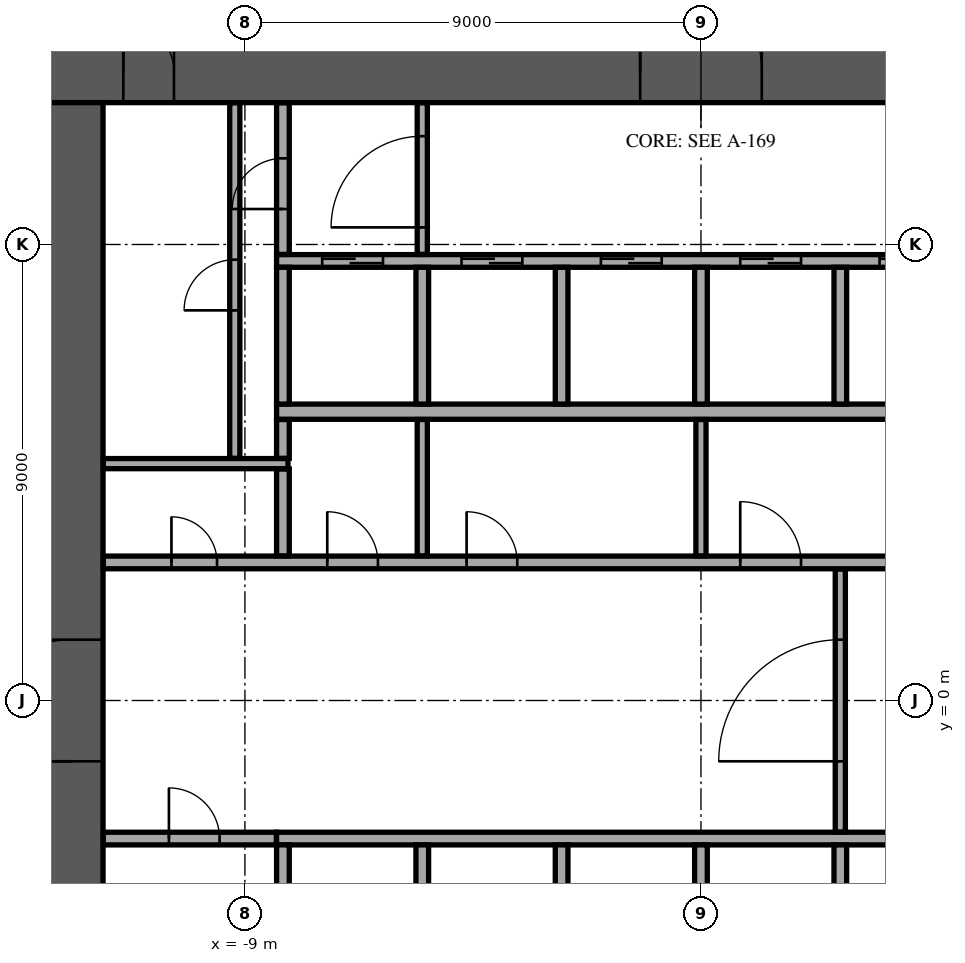
"""IFC4 building model, lengths in metres.
Left out: names, types, materials, properties, quantities, classifications, styles, units other than length and angle.
Written with IfcOpenShell. Run it as: python <this file> out.ifc"""

import sys

from ifc_helpers import new_model, si_unit, direction, frame, frame_2d, origin, place, context, subcontext, project, spatial, rectangle, extrude, element, fill, save


model = new_model("IFC4")
c1 = context("Model", 3, precision=1e-05, world=origin(), true_north=direction((0.0, 1.0)))
c2 = subcontext(c1, "Body", "Model", "MODEL_VIEW")
j1 = project(units=[si_unit("LENGTHUNIT", "METRE"), si_unit("PLANEANGLEUNIT", "RADIAN")], contexts=[c1])
p1 = place(None, origin())
s1 = spatial("IfcSite", under=j1, at=p1, CompositionType="ELEMENT")
p2 = place(p1, origin())
s2 = spatial("IfcBuilding", under=s1, at=p2, CompositionType="ELEMENT")
p3 = place(p2, frame((0.0, 0.0, 27.3)))
s3 = spatial("IfcBuildingStorey", under=s2, at=p3, CompositionType="ELEMENT", Elevation=27.3)
p4 = place(p3, frame((-13.0, 12.4, 0.0), z_axis=(0.0, 0.0, 1.0), x_axis=(1.0, 0.0, 0.0)))
e1 = element("IfcWall", 1, at=p4, inside=s3, PredefinedType="SHEAR", context=c2, shape_type="SweptSolid", body=[
    extrude(rectangle(XDim=26.0, YDim=1.2, at=frame_2d((13.0, 0.0))), origin(), (0.0, 0.0, 1.0), 4.35),
])
p5 = place(p4, frame((11.8, 0.0, 0.0)))
e2 = element("IfcOpeningElement", 2, at=p5, cuts=e1, PredefinedType="OPENING", context=c2, shape_type="SweptSolid", body=[
    extrude(rectangle(XDim=2.4, YDim=2.4, at=frame_2d((1.2, 1.2))), frame((0.0, 0.61, 0.0), z_axis=(0.0, -1.0, 0.0), x_axis=(1.0, 0.0, 0.0)), (0.0, 0.0, 1.0), 1.22),
])
p6 = place(p4, frame((22.625, 0.0, 0.0)))
e3 = element("IfcOpeningElement", 3, at=p6, cuts=e1, PredefinedType="OPENING", context=c2, shape_type="SweptSolid", body=[
    extrude(rectangle(XDim=1.2, YDim=2.1, at=frame_2d((0.6, 1.05))), frame((0.0, 0.61, 0.0), z_axis=(0.0, -1.0, 0.0), x_axis=(1.0, 0.0, 0.0)), (0.0, 0.0, 1.0), 1.22),
])
p7 = place(p4, frame((1.6, 0.0, 0.0)))
e4 = element("IfcOpeningElement", 4, at=p7, cuts=e1, PredefinedType="OPENING", context=c2, shape_type="SweptSolid", body=[
    extrude(rectangle(XDim=1.0, YDim=2.1, at=frame_2d((0.5, 1.05))), frame((0.0, 0.61, 0.0), z_axis=(0.0, -1.0, 0.0), x_axis=(1.0, 0.0, 0.0)), (0.0, 0.0, 1.0), 1.22),
])
p8 = place(p3, frame((-12.4, -11.8, 0.0), z_axis=(0.0, 0.0, 1.0), x_axis=(0.0, 1.0, 0.0)))
e5 = element("IfcWall", 5, at=p8, inside=s3, PredefinedType="SHEAR", context=c2, shape_type="SweptSolid", body=[
    extrude(rectangle(XDim=23.6, YDim=1.2, at=frame_2d((11.8, 0.0))), origin(), (0.0, 0.0, 1.0), 4.35),
])
p9 = place(p8, frame((10.6, 0.0, 0.0)))
e6 = element("IfcOpeningElement", 6, at=p9, cuts=e5, PredefinedType="OPENING", context=c2, shape_type="SweptSolid", body=[
    extrude(rectangle(XDim=2.4, YDim=2.4, at=frame_2d((1.2, 1.2))), frame((0.0, 0.61, 0.0), z_axis=(0.0, -1.0, 0.0), x_axis=(1.0, 0.0, 0.0)), (0.0, 0.0, 1.0), 1.22),
])
p10 = place(p3, frame((-8.375, 5.7, 0.0), z_axis=(0.0, 0.0, 1.0), x_axis=(1.0, 0.0, 0.0)))
e7 = element("IfcWall", 7, at=p10, inside=s3, PredefinedType="SOLIDWALL", context=c2, shape_type="SweptSolid", body=[
    extrude(rectangle(XDim=16.75, YDim=0.3, at=frame_2d((8.375, 0.0))), origin(), (0.0, 0.0, 1.0), 4.35),
])
p11 = place(p3, frame((-8.375, 8.675, 0.0), z_axis=(0.0, 0.0, 1.0), x_axis=(1.0, 0.0, 0.0)))
e8 = element("IfcWall", 8, at=p11, inside=s3, PredefinedType="SOLIDWALL", context=c2, shape_type="SweptSolid", body=[
    extrude(rectangle(XDim=16.75, YDim=0.25, at=frame_2d((8.375, 0.0))), origin(), (0.0, 0.0, 1.0), 4.35),
])
p12 = place(p11, frame((0.9, 0.0, 0.0)))
e9 = element("IfcOpeningElement", 9, at=p12, cuts=e8, PredefinedType="OPENING", context=c2, shape_type="SweptSolid", body=[
    extrude(rectangle(XDim=1.2, YDim=2.1, at=frame_2d((0.6, 1.05))), frame((0.0, 0.135, 0.0), z_axis=(0.0, -1.0, 0.0), x_axis=(1.0, 0.0, 0.0)), (0.0, 0.0, 1.0), 0.27),
])
p13 = place(p11, frame((3.65, 0.0, 0.0)))
e10 = element("IfcOpeningElement", 10, at=p13, cuts=e8, PredefinedType="OPENING", context=c2, shape_type="SweptSolid", body=[
    extrude(rectangle(XDim=1.2, YDim=2.1, at=frame_2d((0.6, 1.05))), frame((0.0, 0.135, 0.0), z_axis=(0.0, -1.0, 0.0), x_axis=(1.0, 0.0, 0.0)), (0.0, 0.0, 1.0), 0.27),
])
p14 = place(p11, frame((6.4, 0.0, 0.0)))
e11 = element("IfcOpeningElement", 11, at=p14, cuts=e8, PredefinedType="OPENING", context=c2, shape_type="SweptSolid", body=[
    extrude(rectangle(XDim=1.2, YDim=2.1, at=frame_2d((0.6, 1.05))), frame((0.0, 0.135, 0.0), z_axis=(0.0, -1.0, 0.0), x_axis=(1.0, 0.0, 0.0)), (0.0, 0.0, 1.0), 0.27),
])
p15 = place(p11, frame((9.15, 0.0, 0.0)))
e12 = element("IfcOpeningElement", 12, at=p15, cuts=e8, PredefinedType="OPENING", context=c2, shape_type="SweptSolid", body=[
    extrude(rectangle(XDim=1.2, YDim=2.1, at=frame_2d((0.6, 1.05))), frame((0.0, 0.135, 0.0), z_axis=(0.0, -1.0, 0.0), x_axis=(1.0, 0.0, 0.0)), (0.0, 0.0, 1.0), 0.27),
])
p16 = place(p11, frame((11.9, 0.0, 0.0)))
e13 = element("IfcOpeningElement", 13, at=p16, cuts=e8, PredefinedType="OPENING", context=c2, shape_type="SweptSolid", body=[
    extrude(rectangle(XDim=1.2, YDim=2.1, at=frame_2d((0.6, 1.05))), frame((0.0, 0.135, 0.0), z_axis=(0.0, -1.0, 0.0), x_axis=(1.0, 0.0, 0.0)), (0.0, 0.0, 1.0), 0.27),
])
p17 = place(p11, frame((14.65, 0.0, 0.0)))
e14 = element("IfcOpeningElement", 14, at=p17, cuts=e8, PredefinedType="OPENING", context=c2, shape_type="SweptSolid", body=[
    extrude(rectangle(XDim=1.2, YDim=2.1, at=frame_2d((0.6, 1.05))), frame((0.0, 0.135, 0.0), z_axis=(0.0, -1.0, 0.0), x_axis=(1.0, 0.0, 0.0)), (0.0, 0.0, 1.0), 0.27),
])
for number, where, z_axis, x_axis in (
    (15, (-8.25, 5.85, 0.0), (0.0, 0.0, 1.0), (0.0, 1.0, 0.0)),
    (16, (-5.5, 5.85, 0.0), (0.0, 0.0, 1.0), (0.0, 1.0, 0.0)),
    (17, (-2.75, 5.85, 0.0), (0.0, 0.0, 1.0), (0.0, 1.0, 0.0)),
    (18, (0.0, 5.85, 0.0), (0.0, 0.0, 1.0), (0.0, 1.0, 0.0)),
    (19, (2.75, 5.85, 0.0), (0.0, 0.0, 1.0), (0.0, 1.0, 0.0)),
):
    element("IfcWall", number, at=place(p3, frame(where, z_axis=z_axis, x_axis=x_axis)), inside=s3, PredefinedType="SOLIDWALL", context=c2, shape_type="SweptSolid", body=[
        extrude(rectangle(XDim=2.7, YDim=0.25, at=frame_2d((1.35, 0.0))), origin(), (0.0, 0.0, 1.0), 4.35),
    ])
p18 = place(p3, frame((-8.375, -2.725, 0.0), z_axis=(0.0, 0.0, 1.0), x_axis=(1.0, 0.0, 0.0)))
e20 = element("IfcWall", 20, at=p18, inside=s3, PredefinedType="SOLIDWALL", context=c2, shape_type="SweptSolid", body=[
    extrude(rectangle(XDim=14.0, YDim=0.25, at=frame_2d((7.0, 0.0))), origin(), (0.0, 0.0, 1.0), 4.35),
])
for number, where, z_axis, x_axis in (
    (21, (-8.25, -5.55, 0.0), (0.0, 0.0, 1.0), (0.0, 1.0, 0.0)),
    (22, (-5.5, -5.55, 0.0), (0.0, 0.0, 1.0), (0.0, 1.0, 0.0)),
    (23, (-2.75, -5.55, 0.0), (0.0, 0.0, 1.0), (0.0, 1.0, 0.0)),
    (24, (0.0, -5.55, 0.0), (0.0, 0.0, 1.0), (0.0, 1.0, 0.0)),
    (25, (2.75, -5.55, 0.0), (0.0, 0.0, 1.0), (0.0, 1.0, 0.0)),
):
    element("IfcWall", number, at=place(p3, frame(where, z_axis=z_axis, x_axis=x_axis)), inside=s3, PredefinedType="SOLIDWALL", context=c2, shape_type="SweptSolid", body=[
        extrude(rectangle(XDim=2.7, YDim=0.25, at=frame_2d((1.35, 0.0))), origin(), (0.0, 0.0, 1.0), 4.35),
    ])
p19 = place(p3, frame((-11.795, -2.725, 0.0), z_axis=(0.0, 0.0, 1.0), x_axis=(1.0, 0.0, 0.0)))
e26 = element("IfcWall", 26, at=p19, inside=s3, PredefinedType="PARTITIONING", context=c2, shape_type="SweptSolid", body=[
    extrude(rectangle(XDim=3.415, YDim=0.25, at=frame_2d((1.708, 0.0))), origin(), (0.0, 0.0, 1.0), 4.35),
])
p20 = place(p19, frame((1.295, 0.0, 0.0)))
e27 = element("IfcOpeningElement", 27, at=p20, cuts=e26, PredefinedType="OPENING", context=c2, shape_type="SweptSolid", body=[
    extrude(rectangle(XDim=1.0, YDim=2.1, at=frame_2d((0.5, 1.05))), frame((0.0, 0.135, 0.0), z_axis=(0.0, -1.0, 0.0), x_axis=(1.0, 0.0, 0.0)), (0.0, 0.0, 1.0), 0.27),
])
p21 = place(p3, frame((2.75, -2.595, 0.0), z_axis=(0.0, 0.0, 1.0), x_axis=(0.0, 1.0, 0.0)))
e28 = element("IfcWall", 28, at=p21, inside=s3, PredefinedType="PARTITIONING", context=c2, shape_type="SweptSolid", body=[
    extrude(rectangle(XDim=5.19, YDim=0.2, at=frame_2d((2.595, 0.0))), origin(), (0.0, 0.0, 1.0), 4.35),
])
p22 = place(p21, frame((1.395, 0.0, 0.0)))
e29 = element("IfcOpeningElement", 29, at=p22, cuts=e28, PredefinedType="OPENING", context=c2, shape_type="SweptSolid", body=[
    extrude(rectangle(XDim=2.4, YDim=2.4, at=frame_2d((1.2, 1.2))), frame((0.0, 0.11, 0.0), z_axis=(0.0, -1.0, 0.0), x_axis=(1.0, 0.0, 0.0)), (0.0, 0.0, 1.0), 0.22),
])
p23 = place(p3, frame((-11.795, 2.725, 0.0), z_axis=(0.0, 0.0, 1.0), x_axis=(1.0, 0.0, 0.0)))
e30 = element("IfcWall", 30, at=p23, inside=s3, PredefinedType="PARTITIONING", context=c2, shape_type="SweptSolid", body=[
    extrude(rectangle(XDim=23.59, YDim=0.25, at=frame_2d((11.795, 0.0))), origin(), (0.0, 0.0, 1.0), 4.35),
])
p24 = place(p23, frame((21.345, 0.0, 0.0)))
e31 = element("IfcOpeningElement", 31, at=p24, cuts=e30, PredefinedType="OPENING", context=c2, shape_type="SweptSolid", body=[
    extrude(rectangle(XDim=0.9, YDim=2.1, at=frame_2d((0.45, 1.05))), frame((0.0, 0.135, 0.0), z_axis=(0.0, -1.0, 0.0), x_axis=(1.0, 0.0, 0.0)), (0.0, 0.0, 1.0), 0.27),
])
p25 = place(p23, frame((1.345, 0.0, 0.0)))
e32 = element("IfcOpeningElement", 32, at=p25, cuts=e30, PredefinedType="OPENING", context=c2, shape_type="SweptSolid", body=[
    extrude(rectangle(XDim=0.9, YDim=2.1, at=frame_2d((0.45, 1.05))), frame((0.0, 0.135, 0.0), z_axis=(0.0, -1.0, 0.0), x_axis=(1.0, 0.0, 0.0)), (0.0, 0.0, 1.0), 0.27),
])
p26 = place(p23, frame((4.42, 0.0, 0.0)))
e33 = element("IfcOpeningElement", 33, at=p26, cuts=e30, PredefinedType="OPENING", context=c2, shape_type="SweptSolid", body=[
    extrude(rectangle(XDim=1.0, YDim=2.1, at=frame_2d((0.5, 1.05))), frame((0.0, 0.135, 0.0), z_axis=(0.0, -1.0, 0.0), x_axis=(1.0, 0.0, 0.0)), (0.0, 0.0, 1.0), 0.27),
])
p27 = place(p23, frame((7.17, 0.0, 0.0)))
e34 = element("IfcOpeningElement", 34, at=p27, cuts=e30, PredefinedType="OPENING", context=c2, shape_type="SweptSolid", body=[
    extrude(rectangle(XDim=1.0, YDim=2.1, at=frame_2d((0.5, 1.05))), frame((0.0, 0.135, 0.0), z_axis=(0.0, -1.0, 0.0), x_axis=(1.0, 0.0, 0.0)), (0.0, 0.0, 1.0), 0.27),
])
p28 = place(p23, frame((12.57, 0.0, 0.0)))
e35 = element("IfcOpeningElement", 35, at=p28, cuts=e30, PredefinedType="OPENING", context=c2, shape_type="SweptSolid", body=[
    extrude(rectangle(XDim=1.2, YDim=2.1, at=frame_2d((0.6, 1.05))), frame((0.0, 0.135, 0.0), z_axis=(0.0, -1.0, 0.0), x_axis=(1.0, 0.0, 0.0)), (0.0, 0.0, 1.0), 0.27),
])
p29 = place(p3, frame((-8.25, 2.855, 0.0), z_axis=(0.0, 0.0, 1.0), x_axis=(0.0, 1.0, 0.0)))
e36 = element("IfcWall", 36, at=p29, inside=s3, PredefinedType="PARTITIONING", context=c2, shape_type="SweptSolid", body=[
    extrude(rectangle(XDim=1.715, YDim=0.25, at=frame_2d((0.857, 0.0))), origin(), (0.0, 0.0, 1.0), 4.35),
])
for number, where, z_axis, x_axis in (
    (37, (-5.5, 2.855, 0.0), (0.0, 0.0, 1.0), (0.0, 1.0, 0.0)),
    (38, (0.0, 2.855, 0.0), (0.0, 0.0, 1.0), (0.0, 1.0, 0.0)),
):
    element("IfcWall", number, at=place(p3, frame(where, z_axis=z_axis, x_axis=x_axis)), inside=s3, PredefinedType="PARTITIONING", context=c2, shape_type="SweptSolid", body=[
        extrude(rectangle(XDim=2.69, YDim=0.2, at=frame_2d((1.345, 0.0))), origin(), (0.0, 0.0, 1.0), 4.35),
    ])
p30 = place(p3, frame((-11.795, 4.675, 0.0), z_axis=(0.0, 0.0, 1.0), x_axis=(1.0, 0.0, 0.0)))
e39 = element("IfcWall", 39, at=p30, inside=s3, PredefinedType="PARTITIONING", context=c2, shape_type="SweptSolid", body=[
    extrude(rectangle(XDim=3.645, YDim=0.2, at=frame_2d((1.823, 0.0))), origin(), (0.0, 0.0, 1.0), 4.35),
])
p31 = place(p3, frame((-9.2, 4.78, 0.0), z_axis=(0.0, 0.0, 1.0), x_axis=(0.0, 1.0, 0.0)))
e40 = element("IfcWall", 40, at=p31, inside=s3, PredefinedType="PARTITIONING", context=c2, shape_type="SweptSolid", body=[
    extrude(rectangle(XDim=7.015, YDim=0.2, at=frame_2d((3.507, 0.0))), origin(), (0.0, 0.0, 1.0), 4.35),
])
p32 = place(p31, frame((2.92, 0.0, 0.0)))
e41 = element("IfcOpeningElement", 41, at=p32, cuts=e40, PredefinedType="OPENING", context=c2, shape_type="SweptSolid", body=[
    extrude(rectangle(XDim=1.0, YDim=2.1, at=frame_2d((0.5, 1.05))), frame((0.0, 0.11, 0.0), z_axis=(0.0, -1.0, 0.0), x_axis=(1.0, 0.0, 0.0)), (0.0, 0.0, 1.0), 0.22),
])
p33 = place(p3, frame((-8.25, 4.78, 0.0), z_axis=(0.0, 0.0, 1.0), x_axis=(0.0, 1.0, 0.0)))
e42 = element("IfcWall", 42, at=p33, inside=s3, PredefinedType="PARTITIONING", context=c2, shape_type="SweptSolid", body=[
    extrude(rectangle(XDim=0.765, YDim=0.25, at=frame_2d((0.382, 0.0))), origin(), (0.0, 0.0, 1.0), 4.35),
])
p34 = place(p3, frame((-8.25, 8.805, 0.0), z_axis=(0.0, 0.0, 1.0), x_axis=(0.0, 1.0, 0.0)))
e43 = element("IfcWall", 43, at=p34, inside=s3, PredefinedType="PARTITIONING", context=c2, shape_type="SweptSolid", body=[
    extrude(rectangle(XDim=2.99, YDim=0.25, at=frame_2d((1.495, 0.0))), origin(), (0.0, 0.0, 1.0), 4.35),
])
p35 = place(p34, frame((0.895, 0.0, 0.0)))
e44 = element("IfcOpeningElement", 44, at=p35, cuts=e43, PredefinedType="OPENING", context=c2, shape_type="SweptSolid", body=[
    extrude(rectangle(XDim=1.0, YDim=2.1, at=frame_2d((0.5, 1.05))), frame((0.0, 0.135, 0.0), z_axis=(0.0, -1.0, 0.0), x_axis=(1.0, 0.0, 0.0)), (0.0, 0.0, 1.0), 0.27),
])
p36 = place(p3, frame((-5.5, 8.805, 0.0), z_axis=(0.0, 0.0, 1.0), x_axis=(0.0, 1.0, 0.0)))
e45 = element("IfcWall", 45, at=p36, inside=s3, PredefinedType="PARTITIONING", context=c2, shape_type="SweptSolid", body=[
    extrude(rectangle(XDim=2.99, YDim=0.2, at=frame_2d((1.495, 0.0))), origin(), (0.0, 0.0, 1.0), 4.35),
])
p37 = place(p36, frame((0.532, 0.0, 0.0)))
e46 = element("IfcOpeningElement", 46, at=p37, cuts=e45, PredefinedType="OPENING", context=c2, shape_type="SweptSolid", body=[
    extrude(rectangle(XDim=1.8, YDim=2.1, at=frame_2d((0.9, 1.05))), frame((0.0, 0.11, 0.0), z_axis=(0.0, -1.0, 0.0), x_axis=(1.0, 0.0, 0.0)), (0.0, 0.0, 1.0), 0.22),
])
p38 = place(p5, origin())
e47 = element("IfcDoor", 47, at=p38, inside=s3, OperationType="SINGLE_SWING_LEFT", PredefinedType="DOOR", context=c2, shape_type="SweptSolid", body=[
    extrude(rectangle(XDim=2.4, YDim=2.4, at=frame_2d((1.2, 1.2))), frame((0.0, 0.025, 0.0), z_axis=(0.0, -1.0, 0.0), x_axis=(1.0, 0.0, 0.0)), (0.0, 0.0, 1.0), 0.05),
])
fill(e2, e47)
p39 = place(p7, origin())
e48 = element("IfcDoor", 48, at=p39, inside=s3, OperationType="SINGLE_SWING_LEFT", PredefinedType="DOOR", context=c2, shape_type="SweptSolid", body=[
    extrude(rectangle(XDim=1.0, YDim=2.1, at=frame_2d((0.5, 1.05))), frame((0.0, 0.025, 0.0), z_axis=(0.0, -1.0, 0.0), x_axis=(1.0, 0.0, 0.0)), (0.0, 0.0, 1.0), 0.05),
])
fill(e4, e48)
p40 = place(p9, origin())
e49 = element("IfcDoor", 49, at=p40, inside=s3, OperationType="SINGLE_SWING_LEFT", PredefinedType="DOOR", context=c2, shape_type="SweptSolid", body=[
    extrude(rectangle(XDim=2.4, YDim=2.4, at=frame_2d((1.2, 1.2))), frame((0.0, 0.025, 0.0), z_axis=(0.0, -1.0, 0.0), x_axis=(1.0, 0.0, 0.0)), (0.0, 0.0, 1.0), 0.05),
])
fill(e6, e49)
p41 = place(p12, origin())
e50 = element("IfcDoor", 50, at=p41, inside=s3, OperationType="DOUBLE_DOOR_SLIDING", PredefinedType="DOOR", context=c2, shape_type="SweptSolid", body=[
    extrude(rectangle(XDim=1.2, YDim=2.1, at=frame_2d((0.6, 1.05))), frame((0.0, 0.025, 0.0), z_axis=(0.0, -1.0, 0.0), x_axis=(1.0, 0.0, 0.0)), (0.0, 0.0, 1.0), 0.05),
])
fill(e9, e50)
p42 = place(p13, origin())
e51 = element("IfcDoor", 51, at=p42, inside=s3, OperationType="DOUBLE_DOOR_SLIDING", PredefinedType="DOOR", context=c2, shape_type="SweptSolid", body=[
    extrude(rectangle(XDim=1.2, YDim=2.1, at=frame_2d((0.6, 1.05))), frame((0.0, 0.025, 0.0), z_axis=(0.0, -1.0, 0.0), x_axis=(1.0, 0.0, 0.0)), (0.0, 0.0, 1.0), 0.05),
])
fill(e10, e51)
p43 = place(p14, origin())
e52 = element("IfcDoor", 52, at=p43, inside=s3, OperationType="DOUBLE_DOOR_SLIDING", PredefinedType="DOOR", context=c2, shape_type="SweptSolid", body=[
    extrude(rectangle(XDim=1.2, YDim=2.1, at=frame_2d((0.6, 1.05))), frame((0.0, 0.025, 0.0), z_axis=(0.0, -1.0, 0.0), x_axis=(1.0, 0.0, 0.0)), (0.0, 0.0, 1.0), 0.05),
])
fill(e11, e52)
p44 = place(p15, origin())
e53 = element("IfcDoor", 53, at=p44, inside=s3, OperationType="DOUBLE_DOOR_SLIDING", PredefinedType="DOOR", context=c2, shape_type="SweptSolid", body=[
    extrude(rectangle(XDim=1.2, YDim=2.1, at=frame_2d((0.6, 1.05))), frame((0.0, 0.025, 0.0), z_axis=(0.0, -1.0, 0.0), x_axis=(1.0, 0.0, 0.0)), (0.0, 0.0, 1.0), 0.05),
])
fill(e12, e53)
p45 = place(p16, origin())
e54 = element("IfcDoor", 54, at=p45, inside=s3, OperationType="DOUBLE_DOOR_SLIDING", PredefinedType="DOOR", context=c2, shape_type="SweptSolid", body=[
    extrude(rectangle(XDim=1.2, YDim=2.1, at=frame_2d((0.6, 1.05))), frame((0.0, 0.025, 0.0), z_axis=(0.0, -1.0, 0.0), x_axis=(1.0, 0.0, 0.0)), (0.0, 0.0, 1.0), 0.05),
])
fill(e13, e54)
p46 = place(p20, origin())
e55 = element("IfcDoor", 55, at=p46, inside=s3, OperationType="SINGLE_SWING_LEFT", PredefinedType="DOOR", context=c2, shape_type="SweptSolid", body=[
    extrude(rectangle(XDim=1.0, YDim=2.1, at=frame_2d((0.5, 1.05))), frame((0.0, 0.025, 0.0), z_axis=(0.0, -1.0, 0.0), x_axis=(1.0, 0.0, 0.0)), (0.0, 0.0, 1.0), 0.05),
])
fill(e27, e55)
p47 = place(p25, origin())
e56 = element("IfcDoor", 56, at=p47, inside=s3, OperationType="SINGLE_SWING_LEFT", PredefinedType="DOOR", context=c2, shape_type="SweptSolid", body=[
    extrude(rectangle(XDim=0.9, YDim=2.1, at=frame_2d((0.45, 1.05))), frame((0.0, 0.025, 0.0), z_axis=(0.0, -1.0, 0.0), x_axis=(1.0, 0.0, 0.0)), (0.0, 0.0, 1.0), 0.05),
])
fill(e32, e56)
p48 = place(p32, origin())
e57 = element("IfcDoor", 57, at=p48, inside=s3, OperationType="SINGLE_SWING_LEFT", PredefinedType="DOOR", context=c2, shape_type="SweptSolid", body=[
    extrude(rectangle(XDim=1.0, YDim=2.1, at=frame_2d((0.5, 1.05))), frame((0.0, 0.025, 0.0), z_axis=(0.0, -1.0, 0.0), x_axis=(1.0, 0.0, 0.0)), (0.0, 0.0, 1.0), 0.05),
])
fill(e41, e57)
p49 = place(p35, origin())
e58 = element("IfcDoor", 58, at=p49, inside=s3, OperationType="SINGLE_SWING_LEFT", PredefinedType="DOOR", context=c2, shape_type="SweptSolid", body=[
    extrude(rectangle(XDim=1.0, YDim=2.1, at=frame_2d((0.5, 1.05))), frame((0.0, 0.025, 0.0), z_axis=(0.0, -1.0, 0.0), x_axis=(1.0, 0.0, 0.0)), (0.0, 0.0, 1.0), 0.05),
])
fill(e44, e58)
p50 = place(p26, origin())
e59 = element("IfcDoor", 59, at=p50, inside=s3, OperationType="SINGLE_SWING_LEFT", PredefinedType="DOOR", context=c2, shape_type="SweptSolid", body=[
    extrude(rectangle(XDim=1.0, YDim=2.1, at=frame_2d((0.5, 1.05))), frame((0.0, 0.025, 0.0), z_axis=(0.0, -1.0, 0.0), x_axis=(1.0, 0.0, 0.0)), (0.0, 0.0, 1.0), 0.05),
])
fill(e33, e59)
p51 = place(p27, origin())
e60 = element("IfcDoor", 60, at=p51, inside=s3, OperationType="SINGLE_SWING_LEFT", PredefinedType="DOOR", context=c2, shape_type="SweptSolid", body=[
    extrude(rectangle(XDim=1.0, YDim=2.1, at=frame_2d((0.5, 1.05))), frame((0.0, 0.025, 0.0), z_axis=(0.0, -1.0, 0.0), x_axis=(1.0, 0.0, 0.0)), (0.0, 0.0, 1.0), 0.05),
])
fill(e34, e60)
p52 = place(p28, origin())
e61 = element("IfcDoor", 61, at=p52, inside=s3, OperationType="SINGLE_SWING_LEFT", PredefinedType="DOOR", context=c2, shape_type="SweptSolid", body=[
    extrude(rectangle(XDim=1.2, YDim=2.1, at=frame_2d((0.6, 1.05))), frame((0.0, 0.025, 0.0), z_axis=(0.0, -1.0, 0.0), x_axis=(1.0, 0.0, 0.0)), (0.0, 0.0, 1.0), 0.05),
])
fill(e35, e61)
p53 = place(p22, origin())
e62 = element("IfcDoor", 62, at=p53, inside=s3, OperationType="SINGLE_SWING_LEFT", PredefinedType="DOOR", context=c2, shape_type="SweptSolid", body=[
    extrude(rectangle(XDim=2.4, YDim=2.4, at=frame_2d((1.2, 1.2))), frame((0.0, 0.025, 0.0), z_axis=(0.0, -1.0, 0.0), x_axis=(1.0, 0.0, 0.0)), (0.0, 0.0, 1.0), 0.05),
])
fill(e29, e62)
p54 = place(p37, origin())
e63 = element("IfcDoor", 63, at=p54, inside=s3, OperationType="SINGLE_SWING_LEFT", PredefinedType="DOOR", context=c2, shape_type="SweptSolid", body=[
    extrude(rectangle(XDim=1.8, YDim=2.1, at=frame_2d((0.9, 1.05))), frame((0.0, 0.025, 0.0), z_axis=(0.0, -1.0, 0.0), x_axis=(1.0, 0.0, 0.0)), (0.0, 0.0, 1.0), 0.05),
])
fill(e46, e63)
save(model, sys.argv[1])
